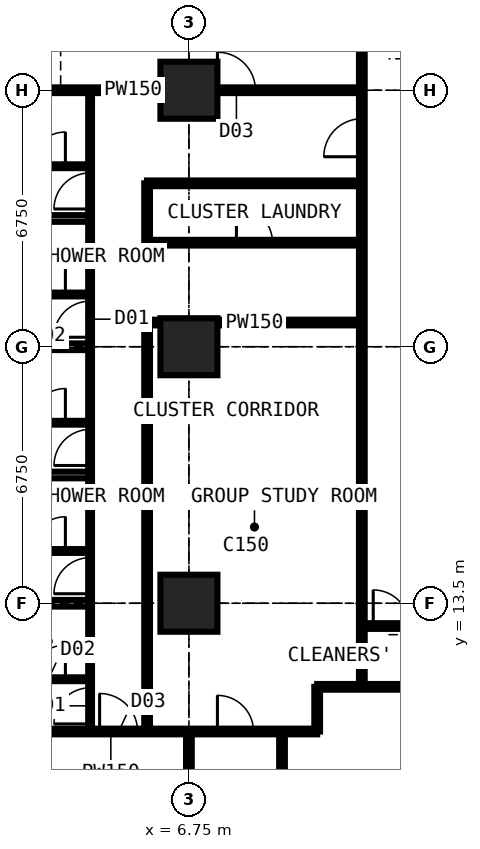
"""IFC4 building model, lengths in metres.
Left out: names, types, materials, properties, quantities, classifications, styles, units other than length and angle.
Written with IfcOpenShell. Run it as: python <this file> out.ifc"""

import sys

from ifc_helpers import new_model, si_unit, direction, frame, frame_2d, origin, origin_2d, place, context, subcontext, project, spatial, rectangle, extrude, element, fill, save


model = new_model("IFC4")
c1 = context("Model", 3, precision=1e-05, world=origin(), true_north=direction((0.0, 1.0)))
c2 = subcontext(c1, "Body", "Model", "MODEL_VIEW")
j1 = project(units=[si_unit("LENGTHUNIT", "METRE"), si_unit("PLANEANGLEUNIT", "RADIAN")], contexts=[c1])
p1 = place(None, origin())
s1 = spatial("IfcSite", under=j1, at=p1, CompositionType="ELEMENT")
p2 = place(p1, origin())
s2 = spatial("IfcBuilding", under=s1, at=p2, CompositionType="ELEMENT")
p3 = place(p2, frame((0.0, 0.0, 108.9)))
s3 = spatial("IfcBuildingStorey", under=s2, at=p3, CompositionType="ELEMENT", Elevation=108.9)
for number, where, z_axis, x_axis in (
    (1, (6.75, 13.5, 0.0), (0.0, 0.0, 1.0), (1.0, 0.0, 0.0)),
    (2, (6.75, 20.25, 0.0), (0.0, 0.0, 1.0), (1.0, 0.0, 0.0)),
    (3, (6.75, 27.0, 0.0), (0.0, 0.0, 1.0), (1.0, 0.0, 0.0)),
):
    element("IfcColumn", number, at=place(p3, frame(where, z_axis=z_axis, x_axis=x_axis)), inside=s3, PredefinedType="COLUMN", context=c2, shape_type="SweptSolid", body=[
        extrude(rectangle(XDim=1.5, YDim=1.5, at=origin_2d()), origin(), (0.0, 0.0, 1.0), 3.6),
    ])
p4 = place(p3, frame((-0.734, 10.125, 0.0), z_axis=(0.0, 0.0, 1.0), x_axis=(1.0, 0.0, 0.0)))
e4 = element("IfcWall", 4, at=p4, inside=s3, PredefinedType="PARTITIONING", context=c2, shape_type="SweptSolid", body=[
    extrude(rectangle(XDim=10.859, YDim=0.15, at=frame_2d((5.429, 0.0))), origin(), (0.0, 0.0, 1.0), 3.375),
])
p5 = place(p4, frame((5.134, 0.0, 0.0)))
e5 = element("IfcOpeningElement", 5, at=p5, cuts=e4, PredefinedType="OPENING", context=c2, shape_type="SweptSolid", body=[
    extrude(rectangle(XDim=1.0, YDim=2.2, at=frame_2d((0.5, 1.1))), frame((0.0, 0.085, 0.0), z_axis=(0.0, -1.0, 0.0), x_axis=(1.0, 0.0, 0.0)), (0.0, 0.0, 1.0), 0.17),
])
p6 = place(p4, frame((8.234, 0.0, 0.0)))
e6 = element("IfcOpeningElement", 6, at=p6, cuts=e4, PredefinedType="OPENING", context=c2, shape_type="SweptSolid", body=[
    extrude(rectangle(XDim=0.95, YDim=2.2, at=frame_2d((0.475, 1.1))), frame((0.0, 0.085, 0.0), z_axis=(0.0, -1.0, 0.0), x_axis=(1.0, 0.0, 0.0)), (0.0, 0.0, 1.0), 0.17),
])
p7 = place(p3, frame((-0.734, 13.5, 0.0), z_axis=(0.0, 0.0, 1.0), x_axis=(1.0, 0.0, 0.0)))
e7 = element("IfcWall", 7, at=p7, inside=s3, PredefinedType="PARTITIONING", context=c2, shape_type="SweptSolid", body=[
    extrude(rectangle(XDim=4.884, YDim=0.175, at=frame_2d((2.442, 0.0))), origin(), (0.0, 0.0, 1.0), 2.877),
])
p8 = place(p3, frame((-0.734, 16.875, 0.0), z_axis=(0.0, 0.0, 1.0), x_axis=(1.0, 0.0, 0.0)))
e8 = element("IfcWall", 8, at=p8, inside=s3, PredefinedType="PARTITIONING", context=c2, shape_type="SweptSolid", body=[
    extrude(rectangle(XDim=4.884, YDim=0.175, at=frame_2d((2.442, 0.0))), origin(), (0.0, 0.0, 1.0), 3.375),
])
p9 = place(p3, frame((-0.734, 20.25, 0.0), z_axis=(0.0, 0.0, 1.0), x_axis=(1.0, 0.0, 0.0)))
e9 = element("IfcWall", 9, at=p9, inside=s3, PredefinedType="PARTITIONING", context=c2, shape_type="SweptSolid", body=[
    extrude(rectangle(XDim=4.884, YDim=0.175, at=frame_2d((2.442, 0.0))), origin(), (0.0, 0.0, 1.0), 2.877),
])
p10 = place(p3, frame((-0.734, 23.625, 0.0), z_axis=(0.0, 0.0, 1.0), x_axis=(1.0, 0.0, 0.0)))
e10 = element("IfcWall", 10, at=p10, inside=s3, PredefinedType="PARTITIONING", context=c2, shape_type="SweptSolid", body=[
    extrude(rectangle(XDim=4.884, YDim=0.175, at=frame_2d((2.442, 0.0))), origin(), (0.0, 0.0, 1.0), 3.375),
])
p11 = place(p3, frame((-0.734, 27.0, 0.0), z_axis=(0.0, 0.0, 1.0), x_axis=(1.0, 0.0, 0.0)))
e11 = element("IfcWall", 11, at=p11, inside=s3, PredefinedType="PARTITIONING", context=c2, shape_type="SweptSolid", body=[
    extrude(rectangle(XDim=12.034, YDim=0.15, at=frame_2d((6.017, 0.0))), origin(), (0.0, 0.0, 1.0), 2.806),
])
p12 = place(p11, frame((8.234, 0.0, 0.0)))
e12 = element("IfcOpeningElement", 12, at=p12, cuts=e11, PredefinedType="OPENING", context=c2, shape_type="SweptSolid", body=[
    extrude(rectangle(XDim=1.0, YDim=2.2, at=frame_2d((0.5, 1.1))), frame((0.0, 0.085, 0.0), z_axis=(0.0, -1.0, 0.0), x_axis=(1.0, 0.0, 0.0)), (0.0, 0.0, 1.0), 0.17),
])
p13 = place(p3, frame((1.95, 11.5, 0.0), z_axis=(0.0, 0.0, 1.0), x_axis=(1.0, 0.0, 0.0)))
e13 = element("IfcWall", 13, at=p13, inside=s3, PredefinedType="PARTITIONING", context=c2, shape_type="SweptSolid", body=[
    extrude(rectangle(XDim=2.2, YDim=0.1, at=frame_2d((1.1, 0.0))), origin(), (0.0, 0.0, 1.0), 3.375),
])
p14 = place(p13, frame((0.65, 0.0, 0.0)))
e14 = element("IfcOpeningElement", 14, at=p14, cuts=e13, PredefinedType="OPENING", context=c2, shape_type="SweptSolid", body=[
    extrude(rectangle(XDim=0.9, YDim=2.2, at=frame_2d((0.45, 1.1))), frame((0.0, 0.06, 0.0), z_axis=(0.0, -1.0, 0.0), x_axis=(1.0, 0.0, 0.0)), (0.0, 0.0, 1.0), 0.12),
])
p15 = place(p3, frame((1.95, 14.875, 0.0), z_axis=(0.0, 0.0, 1.0), x_axis=(1.0, 0.0, 0.0)))
e15 = element("IfcWall", 15, at=p15, inside=s3, PredefinedType="PARTITIONING", context=c2, shape_type="SweptSolid", body=[
    extrude(rectangle(XDim=2.2, YDim=0.1, at=frame_2d((1.1, 0.0))), origin(), (0.0, 0.0, 1.0), 3.375),
])
p16 = place(p15, frame((0.65, 0.0, 0.0)))
e16 = element("IfcOpeningElement", 16, at=p16, cuts=e15, PredefinedType="OPENING", context=c2, shape_type="SweptSolid", body=[
    extrude(rectangle(XDim=0.9, YDim=2.2, at=frame_2d((0.45, 1.1))), frame((0.0, 0.06, 0.0), z_axis=(0.0, -1.0, 0.0), x_axis=(1.0, 0.0, 0.0)), (0.0, 0.0, 1.0), 0.12),
])
p17 = place(p3, frame((1.95, 18.25, 0.0), z_axis=(0.0, 0.0, 1.0), x_axis=(1.0, 0.0, 0.0)))
e17 = element("IfcWall", 17, at=p17, inside=s3, PredefinedType="PARTITIONING", context=c2, shape_type="SweptSolid", body=[
    extrude(rectangle(XDim=2.2, YDim=0.1, at=frame_2d((1.1, 0.0))), origin(), (0.0, 0.0, 1.0), 3.375),
])
p18 = place(p17, frame((0.65, 0.0, 0.0)))
e18 = element("IfcOpeningElement", 18, at=p18, cuts=e17, PredefinedType="OPENING", context=c2, shape_type="SweptSolid", body=[
    extrude(rectangle(XDim=0.9, YDim=2.2, at=frame_2d((0.45, 1.1))), frame((0.0, 0.06, 0.0), z_axis=(0.0, -1.0, 0.0), x_axis=(1.0, 0.0, 0.0)), (0.0, 0.0, 1.0), 0.12),
])
p19 = place(p3, frame((1.95, 21.625, 0.0), z_axis=(0.0, 0.0, 1.0), x_axis=(1.0, 0.0, 0.0)))
e19 = element("IfcWall", 19, at=p19, inside=s3, PredefinedType="PARTITIONING", context=c2, shape_type="SweptSolid", body=[
    extrude(rectangle(XDim=2.2, YDim=0.1, at=frame_2d((1.1, 0.0))), origin(), (0.0, 0.0, 1.0), 3.375),
])
p20 = place(p19, frame((0.65, 0.0, 0.0)))
e20 = element("IfcOpeningElement", 20, at=p20, cuts=e19, PredefinedType="OPENING", context=c2, shape_type="SweptSolid", body=[
    extrude(rectangle(XDim=0.9, YDim=2.2, at=frame_2d((0.45, 1.1))), frame((0.0, 0.06, 0.0), z_axis=(0.0, -1.0, 0.0), x_axis=(1.0, 0.0, 0.0)), (0.0, 0.0, 1.0), 0.12),
])
p21 = place(p3, frame((1.95, 25.0, 0.0), z_axis=(0.0, 0.0, 1.0), x_axis=(1.0, 0.0, 0.0)))
e21 = element("IfcWall", 21, at=p21, inside=s3, PredefinedType="PARTITIONING", context=c2, shape_type="SweptSolid", body=[
    extrude(rectangle(XDim=2.2, YDim=0.1, at=frame_2d((1.1, 0.0))), origin(), (0.0, 0.0, 1.0), 3.375),
])
p22 = place(p21, frame((0.65, 0.0, 0.0)))
e22 = element("IfcOpeningElement", 22, at=p22, cuts=e21, PredefinedType="OPENING", context=c2, shape_type="SweptSolid", body=[
    extrude(rectangle(XDim=0.9, YDim=2.2, at=frame_2d((0.45, 1.1))), frame((0.0, 0.06, 0.0), z_axis=(0.0, -1.0, 0.0), x_axis=(1.0, 0.0, 0.0)), (0.0, 0.0, 1.0), 0.12),
])
p23 = place(p3, frame((4.15, 10.125, 0.0), z_axis=(0.0, 0.0, 1.0), x_axis=(0.0, 1.0, 0.0)))
e23 = element("IfcWall", 23, at=p23, inside=s3, PredefinedType="PARTITIONING", context=c2, shape_type="SweptSolid", body=[
    extrude(rectangle(XDim=16.875, YDim=0.1, at=frame_2d((8.438, 0.0))), origin(), (0.0, 0.0, 1.0), 3.375),
])
p24 = place(p23, frame((0.2, 0.0, 0.0)))
e24 = element("IfcOpeningElement", 24, at=p24, cuts=e23, PredefinedType="OPENING", context=c2, shape_type="SweptSolid", body=[
    extrude(rectangle(XDim=0.95, YDim=2.2, at=frame_2d((0.475, 1.1))), frame((0.0, 0.06, 0.0), z_axis=(0.0, -1.0, 0.0), x_axis=(1.0, 0.0, 0.0)), (0.0, 0.0, 1.0), 0.12),
])
p25 = place(p23, frame((3.625, 0.0, 0.0)))
e25 = element("IfcOpeningElement", 25, at=p25, cuts=e23, PredefinedType="OPENING", context=c2, shape_type="SweptSolid", body=[
    extrude(rectangle(XDim=0.95, YDim=2.2, at=frame_2d((0.475, 1.1))), frame((0.0, 0.06, 0.0), z_axis=(0.0, -1.0, 0.0), x_axis=(1.0, 0.0, 0.0)), (0.0, 0.0, 1.0), 0.12),
])
p26 = place(p23, frame((7.0, 0.0, 0.0)))
e26 = element("IfcOpeningElement", 26, at=p26, cuts=e23, PredefinedType="OPENING", context=c2, shape_type="SweptSolid", body=[
    extrude(rectangle(XDim=0.95, YDim=2.2, at=frame_2d((0.475, 1.1))), frame((0.0, 0.06, 0.0), z_axis=(0.0, -1.0, 0.0), x_axis=(1.0, 0.0, 0.0)), (0.0, 0.0, 1.0), 0.12),
])
p27 = place(p23, frame((10.375, 0.0, 0.0)))
e27 = element("IfcOpeningElement", 27, at=p27, cuts=e23, PredefinedType="OPENING", context=c2, shape_type="SweptSolid", body=[
    extrude(rectangle(XDim=0.95, YDim=2.2, at=frame_2d((0.475, 1.1))), frame((0.0, 0.06, 0.0), z_axis=(0.0, -1.0, 0.0), x_axis=(1.0, 0.0, 0.0)), (0.0, 0.0, 1.0), 0.12),
])
p28 = place(p23, frame((13.75, 0.0, 0.0)))
e28 = element("IfcOpeningElement", 28, at=p28, cuts=e23, PredefinedType="OPENING", context=c2, shape_type="SweptSolid", body=[
    extrude(rectangle(XDim=0.95, YDim=2.2, at=frame_2d((0.475, 1.1))), frame((0.0, 0.06, 0.0), z_axis=(0.0, -1.0, 0.0), x_axis=(1.0, 0.0, 0.0)), (0.0, 0.0, 1.0), 0.12),
])
p29 = place(p3, frame((5.65, 10.125, 0.0), z_axis=(0.0, 0.0, 1.0), x_axis=(0.0, 1.0, 0.0)))
e29 = element("IfcWall", 29, at=p29, inside=s3, PredefinedType="PARTITIONING", context=c2, shape_type="SweptSolid", body=[
    extrude(rectangle(XDim=10.762, YDim=0.15, at=frame_2d((5.381, 0.0))), origin(), (0.0, 0.0, 1.0), 3.375),
])
p30 = place(p3, frame((5.65, 20.887, 0.0), z_axis=(0.0, 0.0, 1.0), x_axis=(1.0, 0.0, 0.0)))
e30 = element("IfcWall", 30, at=p30, inside=s3, PredefinedType="PARTITIONING", context=c2, shape_type="SweptSolid", body=[
    extrude(rectangle(XDim=5.65, YDim=0.15, at=frame_2d((2.825, 0.0))), origin(), (0.0, 0.0, 1.0), 3.375),
])
p31 = place(p3, frame((5.65, 22.988, 0.0), z_axis=(0.0, 0.0, 1.0), x_axis=(0.0, 1.0, 0.0)))
e31 = element("IfcWall", 31, at=p31, inside=s3, PredefinedType="PARTITIONING", context=c2, shape_type="SweptSolid", body=[
    extrude(rectangle(XDim=1.562, YDim=0.15, at=frame_2d((0.781, 0.0))), origin(), (0.0, 0.0, 1.0), 3.375),
])
p32 = place(p3, frame((5.65, 22.988, 0.0), z_axis=(0.0, 0.0, 1.0), x_axis=(1.0, 0.0, 0.0)))
e32 = element("IfcWall", 32, at=p32, inside=s3, PredefinedType="PARTITIONING", context=c2, shape_type="SweptSolid", body=[
    extrude(rectangle(XDim=5.65, YDim=0.15, at=frame_2d((2.825, 0.0))), origin(), (0.0, 0.0, 1.0), 3.375),
])
p33 = place(p32, frame((2.35, 0.0, 0.0)))
e33 = element("IfcOpeningElement", 33, at=p33, cuts=e32, PredefinedType="OPENING", context=c2, shape_type="SweptSolid", body=[
    extrude(rectangle(XDim=0.95, YDim=2.2, at=frame_2d((0.475, 1.1))), frame((0.0, 0.085, 0.0), z_axis=(0.0, -1.0, 0.0), x_axis=(1.0, 0.0, 0.0)), (0.0, 0.0, 1.0), 0.17),
])
p34 = place(p3, frame((5.65, 24.55, 0.0), z_axis=(0.0, 0.0, 1.0), x_axis=(1.0, 0.0, 0.0)))
e34 = element("IfcWall", 34, at=p34, inside=s3, PredefinedType="PARTITIONING", context=c2, shape_type="SweptSolid", body=[
    extrude(rectangle(XDim=5.65, YDim=0.15, at=frame_2d((2.825, 0.0))), origin(), (0.0, 0.0, 1.0), 3.375),
])
p35 = place(p3, frame((6.75, -0.734, 0.0), z_axis=(0.0, 0.0, 1.0), x_axis=(0.0, 1.0, 0.0)))
e35 = element("IfcWall", 35, at=p35, inside=s3, PredefinedType="PARTITIONING", context=c2, shape_type="SweptSolid", body=[
    extrude(rectangle(XDim=10.859, YDim=0.15, at=frame_2d((5.429, 0.0))), origin(), (0.0, 0.0, 1.0), 2.877),
])
p36 = place(p3, frame((9.2, 5.65, 0.0), z_axis=(0.0, 0.0, 1.0), x_axis=(0.0, 1.0, 0.0)))
e36 = element("IfcWall", 36, at=p36, inside=s3, PredefinedType="PARTITIONING", context=c2, shape_type="SweptSolid", body=[
    extrude(rectangle(XDim=4.475, YDim=0.15, at=frame_2d((2.238, 0.0))), origin(), (0.0, 0.0, 1.0), 3.375),
])
p37 = place(p3, frame((10.125, 10.125, 0.0), z_axis=(0.0, 0.0, 1.0), x_axis=(0.0, 1.0, 0.0)))
e37 = element("IfcWall", 37, at=p37, inside=s3, PredefinedType="PARTITIONING", context=c2, shape_type="SweptSolid", body=[
    extrude(rectangle(XDim=1.175, YDim=0.15, at=frame_2d((0.587, 0.0))), origin(), (0.0, 0.0, 1.0), 3.375),
])
p38 = place(p3, frame((10.125, 11.3, 0.0), z_axis=(0.0, 0.0, 1.0), x_axis=(1.0, 0.0, 0.0)))
e38 = element("IfcWall", 38, at=p38, inside=s3, PredefinedType="PARTITIONING", context=c2, shape_type="SweptSolid", body=[
    extrude(rectangle(XDim=20.675, YDim=0.15, at=frame_2d((10.337, 0.0))), origin(), (0.0, 0.0, 1.0), 3.375),
])
p39 = place(p38, frame((11.312, 0.0, 0.0)))
e39 = element("IfcOpeningElement", 39, at=p39, cuts=e38, PredefinedType="OPENING", context=c2, shape_type="SweptSolid", body=[
    extrude(rectangle(XDim=1.0, YDim=2.2, at=frame_2d((0.5, 1.1))), frame((0.0, 0.085, 0.0), z_axis=(0.0, -1.0, 0.0), x_axis=(1.0, 0.0, 0.0)), (0.0, 0.0, 1.0), 0.17),
])
p40 = place(p3, frame((11.3, 11.3, 0.0), z_axis=(0.0, 0.0, 1.0), x_axis=(0.0, 1.0, 0.0)))
e40 = element("IfcWall", 40, at=p40, inside=s3, PredefinedType="PARTITIONING", context=c2, shape_type="SweptSolid", body=[
    extrude(rectangle(XDim=19.075, YDim=0.15, at=frame_2d((9.538, 0.0))), origin(), (0.0, 0.0, 1.0), 3.375),
])
p41 = place(p40, frame((13.95, 0.0, 0.0)))
e41 = element("IfcOpeningElement", 41, at=p41, cuts=e40, PredefinedType="OPENING", context=c2, shape_type="SweptSolid", body=[
    extrude(rectangle(XDim=1.0, YDim=2.2, at=frame_2d((0.5, 1.1))), frame((0.0, 0.085, 0.0), z_axis=(0.0, -1.0, 0.0), x_axis=(1.0, 0.0, 0.0)), (0.0, 0.0, 1.0), 0.17),
])
p42 = place(p3, frame((11.3, 12.9, 0.0), z_axis=(0.0, 0.0, 1.0), x_axis=(1.0, 0.0, 0.0)))
e42 = element("IfcWall", 42, at=p42, inside=s3, PredefinedType="PARTITIONING", context=c2, shape_type="SweptSolid", body=[
    extrude(rectangle(XDim=1.6, YDim=0.15, at=frame_2d((0.8, 0.0))), origin(), (0.0, 0.0, 1.0), 2.806),
])
p43 = place(p42, frame((0.3, 0.0, 0.0)))
e43 = element("IfcOpeningElement", 43, at=p43, cuts=e42, PredefinedType="OPENING", context=c2, shape_type="SweptSolid", body=[
    extrude(rectangle(XDim=0.95, YDim=2.2, at=frame_2d((0.475, 1.1))), frame((0.0, 0.085, 0.0), z_axis=(0.0, -1.0, 0.0), x_axis=(1.0, 0.0, 0.0)), (0.0, 0.0, 1.0), 0.17),
])
p44 = place(p43, origin())
e44 = element("IfcDoor", 44, at=p44, inside=s3, OperationType="SINGLE_SWING_LEFT", PredefinedType="DOOR", context=c2, shape_type="SweptSolid", body=[
    extrude(rectangle(XDim=0.95, YDim=2.2, at=frame_2d((0.475, 1.1))), frame((0.0, 0.025, 0.0), z_axis=(0.0, -1.0, 0.0), x_axis=(1.0, 0.0, 0.0)), (0.0, 0.0, 1.0), 0.05),
])
fill(e43, e44)
p45 = place(p5, origin())
e45 = element("IfcDoor", 45, at=p45, inside=s3, OperationType="SINGLE_SWING_LEFT", PredefinedType="DOOR", context=c2, shape_type="SweptSolid", body=[
    extrude(rectangle(XDim=1.0, YDim=2.2, at=frame_2d((0.5, 1.1))), frame((0.0, 0.025, 0.0), z_axis=(0.0, -1.0, 0.0), x_axis=(1.0, 0.0, 0.0)), (0.0, 0.0, 1.0), 0.05),
])
fill(e5, e45)
p46 = place(p24, origin())
e46 = element("IfcDoor", 46, at=p46, inside=s3, OperationType="SINGLE_SWING_LEFT", PredefinedType="DOOR", context=c2, shape_type="SweptSolid", body=[
    extrude(rectangle(XDim=0.95, YDim=2.2, at=frame_2d((0.475, 1.1))), frame((0.0, 0.025, 0.0), z_axis=(0.0, -1.0, 0.0), x_axis=(1.0, 0.0, 0.0)), (0.0, 0.0, 1.0), 0.05),
])
fill(e24, e46)
p47 = place(p14, origin())
e47 = element("IfcDoor", 47, at=p47, inside=s3, OperationType="SINGLE_SWING_RIGHT", PredefinedType="DOOR", context=c2, shape_type="SweptSolid", body=[
    extrude(rectangle(XDim=0.9, YDim=2.2, at=frame_2d((0.45, 1.1))), frame((0.0, 0.025, 0.0), z_axis=(0.0, -1.0, 0.0), x_axis=(1.0, 0.0, 0.0)), (0.0, 0.0, 1.0), 0.05),
])
fill(e14, e47)
p48 = place(p25, origin())
e48 = element("IfcDoor", 48, at=p48, inside=s3, OperationType="SINGLE_SWING_LEFT", PredefinedType="DOOR", context=c2, shape_type="SweptSolid", body=[
    extrude(rectangle(XDim=0.95, YDim=2.2, at=frame_2d((0.475, 1.1))), frame((0.0, 0.025, 0.0), z_axis=(0.0, -1.0, 0.0), x_axis=(1.0, 0.0, 0.0)), (0.0, 0.0, 1.0), 0.05),
])
fill(e25, e48)
p49 = place(p16, origin())
e49 = element("IfcDoor", 49, at=p49, inside=s3, OperationType="SINGLE_SWING_RIGHT", PredefinedType="DOOR", context=c2, shape_type="SweptSolid", body=[
    extrude(rectangle(XDim=0.9, YDim=2.2, at=frame_2d((0.45, 1.1))), frame((0.0, 0.025, 0.0), z_axis=(0.0, -1.0, 0.0), x_axis=(1.0, 0.0, 0.0)), (0.0, 0.0, 1.0), 0.05),
])
fill(e16, e49)
p50 = place(p26, origin())
e50 = element("IfcDoor", 50, at=p50, inside=s3, OperationType="SINGLE_SWING_LEFT", PredefinedType="DOOR", context=c2, shape_type="SweptSolid", body=[
    extrude(rectangle(XDim=0.95, YDim=2.2, at=frame_2d((0.475, 1.1))), frame((0.0, 0.025, 0.0), z_axis=(0.0, -1.0, 0.0), x_axis=(1.0, 0.0, 0.0)), (0.0, 0.0, 1.0), 0.05),
])
fill(e26, e50)
p51 = place(p18, origin())
e51 = element("IfcDoor", 51, at=p51, inside=s3, OperationType="SINGLE_SWING_RIGHT", PredefinedType="DOOR", context=c2, shape_type="SweptSolid", body=[
    extrude(rectangle(XDim=0.9, YDim=2.2, at=frame_2d((0.45, 1.1))), frame((0.0, 0.025, 0.0), z_axis=(0.0, -1.0, 0.0), x_axis=(1.0, 0.0, 0.0)), (0.0, 0.0, 1.0), 0.05),
])
fill(e18, e51)
p52 = place(p27, origin())
e52 = element("IfcDoor", 52, at=p52, inside=s3, OperationType="SINGLE_SWING_LEFT", PredefinedType="DOOR", context=c2, shape_type="SweptSolid", body=[
    extrude(rectangle(XDim=0.95, YDim=2.2, at=frame_2d((0.475, 1.1))), frame((0.0, 0.025, 0.0), z_axis=(0.0, -1.0, 0.0), x_axis=(1.0, 0.0, 0.0)), (0.0, 0.0, 1.0), 0.05),
])
fill(e27, e52)
p53 = place(p20, origin())
e53 = element("IfcDoor", 53, at=p53, inside=s3, OperationType="SINGLE_SWING_RIGHT", PredefinedType="DOOR", context=c2, shape_type="SweptSolid", body=[
    extrude(rectangle(XDim=0.9, YDim=2.2, at=frame_2d((0.45, 1.1))), frame((0.0, 0.025, 0.0), z_axis=(0.0, -1.0, 0.0), x_axis=(1.0, 0.0, 0.0)), (0.0, 0.0, 1.0), 0.05),
])
fill(e20, e53)
p54 = place(p28, origin())
e54 = element("IfcDoor", 54, at=p54, inside=s3, OperationType="SINGLE_SWING_LEFT", PredefinedType="DOOR", context=c2, shape_type="SweptSolid", body=[
    extrude(rectangle(XDim=0.95, YDim=2.2, at=frame_2d((0.475, 1.1))), frame((0.0, 0.025, 0.0), z_axis=(0.0, -1.0, 0.0), x_axis=(1.0, 0.0, 0.0)), (0.0, 0.0, 1.0), 0.05),
])
fill(e28, e54)
p55 = place(p22, origin())
e55 = element("IfcDoor", 55, at=p55, inside=s3, OperationType="SINGLE_SWING_RIGHT", PredefinedType="DOOR", context=c2, shape_type="SweptSolid", body=[
    extrude(rectangle(XDim=0.9, YDim=2.2, at=frame_2d((0.45, 1.1))), frame((0.0, 0.025, 0.0), z_axis=(0.0, -1.0, 0.0), x_axis=(1.0, 0.0, 0.0)), (0.0, 0.0, 1.0), 0.05),
])
fill(e22, e55)
p56 = place(p12, origin())
e56 = element("IfcDoor", 56, at=p56, inside=s3, OperationType="SINGLE_SWING_LEFT", PredefinedType="DOOR", context=c2, shape_type="SweptSolid", body=[
    extrude(rectangle(XDim=1.0, YDim=2.2, at=frame_2d((0.5, 1.1))), frame((0.0, 0.025, 0.0), z_axis=(0.0, -1.0, 0.0), x_axis=(1.0, 0.0, 0.0)), (0.0, 0.0, 1.0), 0.05),
])
fill(e12, e56)
p57 = place(p41, origin())
e57 = element("IfcDoor", 57, at=p57, inside=s3, OperationType="SINGLE_SWING_LEFT", PredefinedType="DOOR", context=c2, shape_type="SweptSolid", body=[
    extrude(rectangle(XDim=1.0, YDim=2.2, at=frame_2d((0.5, 1.1))), frame((0.0, 0.025, 0.0), z_axis=(0.0, -1.0, 0.0), x_axis=(1.0, 0.0, 0.0)), (0.0, 0.0, 1.0), 0.05),
])
fill(e41, e57)
p58 = place(p33, origin())
e58 = element("IfcDoor", 58, at=p58, inside=s3, OperationType="SINGLE_SWING_LEFT", PredefinedType="DOOR", context=c2, shape_type="SweptSolid", body=[
    extrude(rectangle(XDim=0.95, YDim=2.2, at=frame_2d((0.475, 1.1))), frame((0.0, 0.025, 0.0), z_axis=(0.0, -1.0, 0.0), x_axis=(1.0, 0.0, 0.0)), (0.0, 0.0, 1.0), 0.05),
])
fill(e33, e58)
p59 = place(p6, origin())
e59 = element("IfcDoor", 59, at=p59, inside=s3, OperationType="SINGLE_SWING_LEFT", PredefinedType="DOOR", context=c2, shape_type="SweptSolid", body=[
    extrude(rectangle(XDim=0.95, YDim=2.2, at=frame_2d((0.475, 1.1))), frame((0.0, 0.025, 0.0), z_axis=(0.0, -1.0, 0.0), x_axis=(1.0, 0.0, 0.0)), (0.0, 0.0, 1.0), 0.05),
])
fill(e6, e59)
save(model, sys.argv[1])
